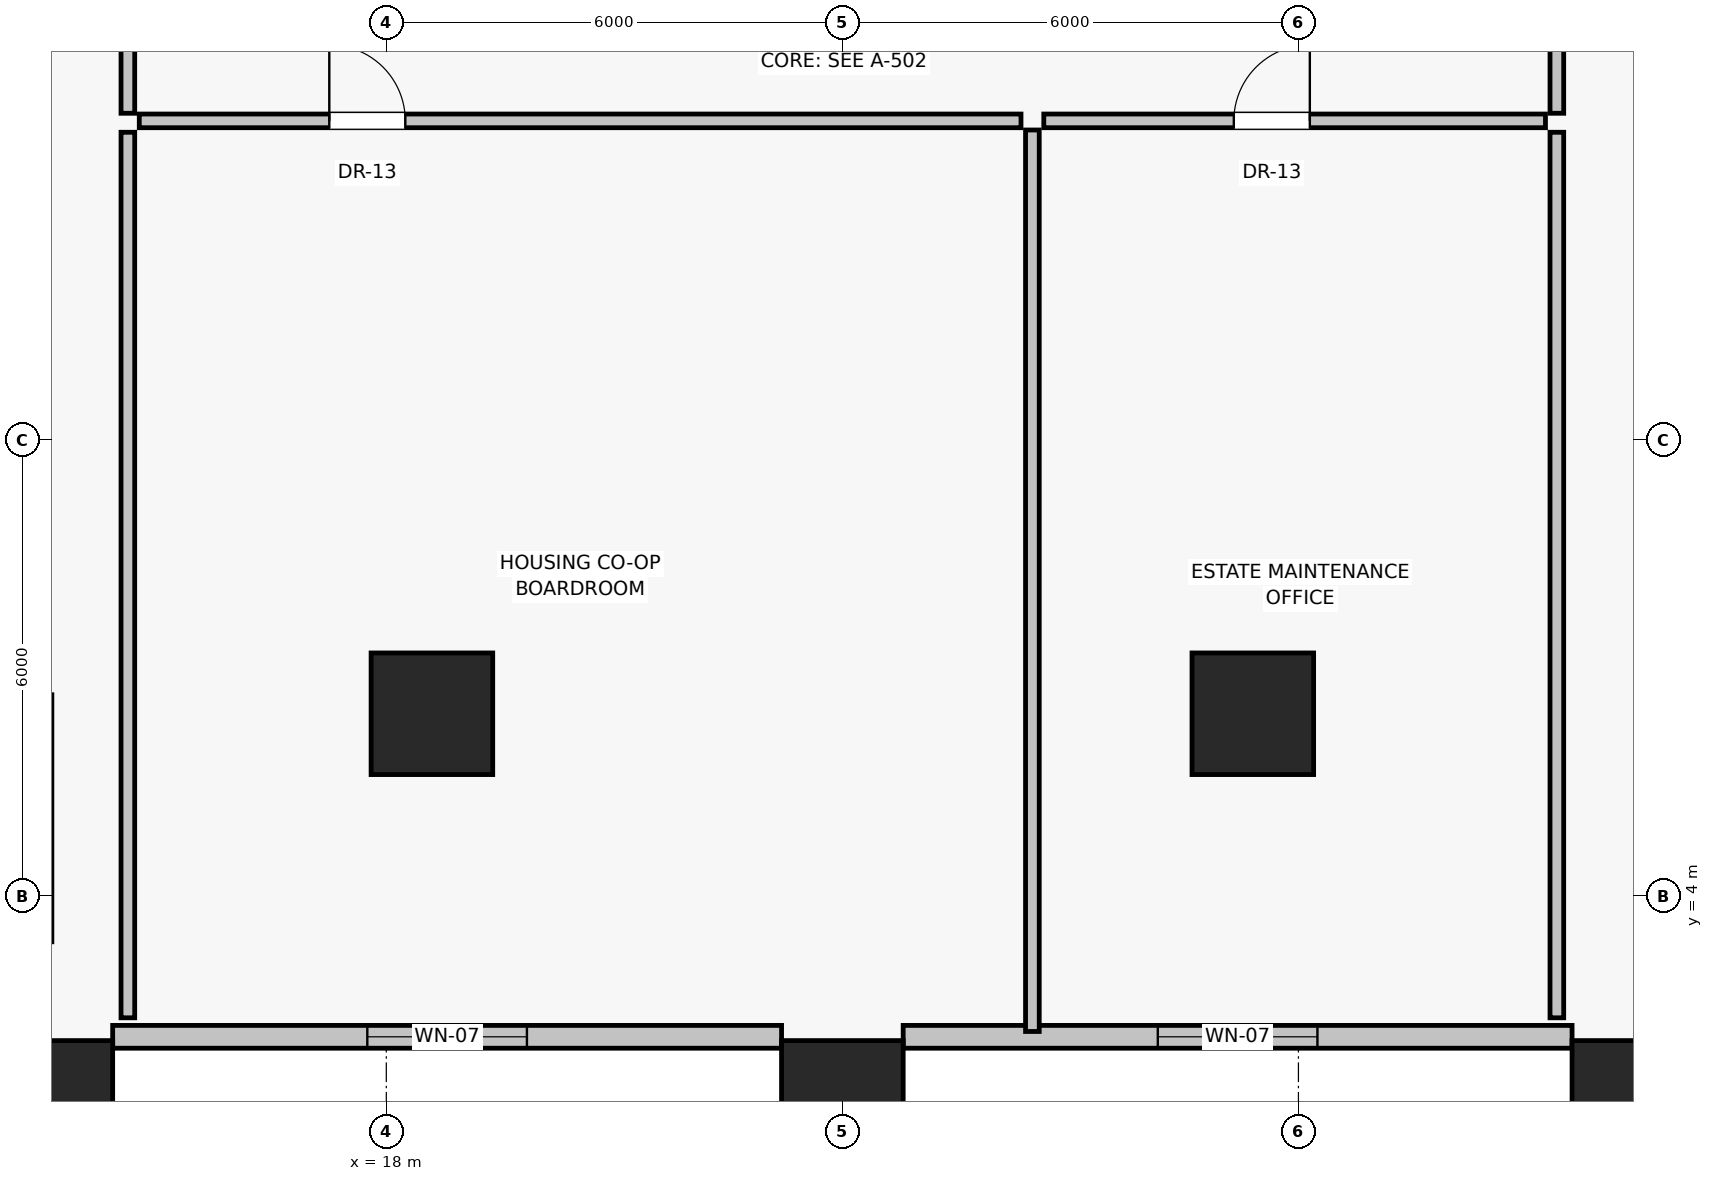
"""IFC4 building model, lengths in metres.
Left out: names, types, materials, properties, quantities, classifications, styles, units other than length and angle.
Written with IfcOpenShell. Run it as: python <this file> out.ifc"""

import sys

from ifc_helpers import new_model, si_unit, direction, frame, frame_2d, origin, origin_2d, place, context, subcontext, project, spatial, rectangle, extrude, source, transform, mapped, element, fill, save


model = new_model("IFC4")
c1 = context("Model", 3, precision=1e-05, world=origin(), true_north=direction((0.0, 1.0)))
c2 = subcontext(c1, "Body", "Model", "MODEL_VIEW")
j1 = project(units=[si_unit("LENGTHUNIT", "METRE"), si_unit("PLANEANGLEUNIT", "RADIAN")], contexts=[c1])
p1 = place(None, origin())
s1 = spatial("IfcSite", under=j1, at=p1, CompositionType="ELEMENT")
p2 = place(p1, origin())
s2 = spatial("IfcBuilding", under=s1, at=p2, CompositionType="ELEMENT")
p3 = place(p2, frame((0.0, 0.0, 18.4)))
s3 = spatial("IfcBuildingStorey", under=s2, at=p3, CompositionType="ELEMENT", Elevation=18.4)
for number, where, z_axis, x_axis in (
    (1, (13.6, 1.3, 0.0), (0.0, 0.0, 1.0), (1.0, 0.0, 0.0)),
    (2, (24.0, 1.3, 0.0), (0.0, 0.0, 1.0), (1.0, 0.0, 0.0)),
    (3, (34.4, 1.3, 0.0), (0.0, 0.0, 1.0), (1.0, 0.0, 0.0)),
    (4, (18.6, 6.4, 0.0), (0.0, 0.0, 1.0), (1.0, 0.0, 0.0)),
    (5, (29.4, 6.4, 0.0), (0.0, 0.0, 1.0), (1.0, 0.0, 0.0)),
):
    element("IfcColumn", number, at=place(p3, frame(where, z_axis=z_axis, x_axis=x_axis)), inside=s3, PredefinedType="COLUMN", context=c2, shape_type="SweptSolid", body=[
        extrude(rectangle(XDim=1.6, YDim=1.6, at=origin_2d()), origin(), (0.0, 0.0, 1.0), 4.4),
    ])
p4 = place(p3, frame((14.4, 2.15, 0.0), z_axis=(0.0, 0.0, 1.0), x_axis=(1.0, 0.0, 0.0)))
e6 = element("IfcWall", 6, at=p4, inside=s3, PredefinedType="SOLIDWALL", context=c2, shape_type="SweptSolid", body=[
    extrude(rectangle(XDim=8.8, YDim=0.3, at=frame_2d((4.4, 0.0))), origin(), (0.0, 0.0, 1.0), 2.95),
])
p5 = place(p4, frame((3.35, 0.0, 0.85)))
e7 = element("IfcOpeningElement", 7, at=p5, cuts=e6, PredefinedType="OPENING", context=c2, shape_type="SweptSolid", body=[
    extrude(rectangle(XDim=2.1, YDim=1.75, at=frame_2d((1.05, 0.875))), frame((0.0, 0.16, 0.0), z_axis=(0.0, -1.0, 0.0), x_axis=(1.0, 0.0, 0.0)), (0.0, 0.0, 1.0), 0.32),
])
p6 = place(p3, frame((24.8, 2.15, 0.0), z_axis=(0.0, 0.0, 1.0), x_axis=(1.0, 0.0, 0.0)))
e8 = element("IfcWall", 8, at=p6, inside=s3, PredefinedType="SOLIDWALL", context=c2, shape_type="SweptSolid", body=[
    extrude(rectangle(XDim=8.8, YDim=0.3, at=frame_2d((4.4, 0.0))), origin(), (0.0, 0.0, 1.0), 2.95),
])
p7 = place(p6, frame((3.35, 0.0, 0.85)))
e9 = element("IfcOpeningElement", 9, at=p7, cuts=e8, PredefinedType="OPENING", context=c2, shape_type="SweptSolid", body=[
    extrude(rectangle(XDim=2.1, YDim=1.75, at=frame_2d((1.05, 0.875))), frame((0.0, 0.16, 0.0), z_axis=(0.0, -1.0, 0.0), x_axis=(1.0, 0.0, 0.0)), (0.0, 0.0, 1.0), 0.32),
])
p8 = place(p3, frame((14.6, 14.3, 0.0), z_axis=(0.0, 0.0, 1.0), x_axis=(0.0, 1.0, 0.0)))
e10 = element("IfcWall", 10, at=p8, inside=s3, PredefinedType="PARTITIONING", context=c2, shape_type="SweptSolid", body=[
    extrude(rectangle(XDim=8.55, YDim=0.18, at=frame_2d((4.275, 0.0))), origin(), (0.0, 0.0, 1.0), 4.05),
])
p9 = place(p8, frame((2.5, 0.0, 0.0)))
e11 = element("IfcOpeningElement", 11, at=p9, cuts=e10, PredefinedType="OPENING", context=c2, shape_type="SweptSolid", body=[
    extrude(rectangle(XDim=1.0, YDim=2.01, at=frame_2d((0.5, 1.005))), frame((0.0, 0.1, 0.0), z_axis=(0.0, -1.0, 0.0), x_axis=(1.0, 0.0, 0.0)), (0.0, 0.0, 1.0), 0.2),
])
p10 = place(p3, frame((14.6, 2.4, 0.0), z_axis=(0.0, 0.0, 1.0), x_axis=(0.0, 1.0, 0.0)))
e12 = element("IfcWall", 12, at=p10, inside=s3, PredefinedType="PARTITIONING", context=c2, shape_type="SweptSolid", body=[
    extrude(rectangle(XDim=11.65, YDim=0.18, at=frame_2d((5.825, 0.0))), origin(), (0.0, 0.0, 1.0), 4.05),
])
p11 = place(p3, frame((14.75, 14.2, 0.0), z_axis=(0.0, 0.0, 1.0), x_axis=(1.0, 0.0, 0.0)))
e13 = element("IfcWall", 13, at=p11, inside=s3, PredefinedType="PARTITIONING", context=c2, shape_type="SweptSolid", body=[
    extrude(rectangle(XDim=11.6, YDim=0.18, at=frame_2d((5.8, 0.0))), origin(), (0.0, 0.0, 1.0), 4.05),
])
p12 = place(p11, frame((2.5, 0.0, 0.0)))
e14 = element("IfcOpeningElement", 14, at=p12, cuts=e13, PredefinedType="OPENING", context=c2, shape_type="SweptSolid", body=[
    extrude(rectangle(XDim=1.0, YDim=2.01, at=frame_2d((0.5, 1.005))), frame((0.0, 0.1, 0.0), z_axis=(0.0, -1.0, 0.0), x_axis=(1.0, 0.0, 0.0)), (0.0, 0.0, 1.0), 0.2),
])
p13 = place(p3, frame((26.65, 14.2, 0.0), z_axis=(0.0, 0.0, 1.0), x_axis=(1.0, 0.0, 0.0)))
e15 = element("IfcWall", 15, at=p13, inside=s3, PredefinedType="PARTITIONING", context=c2, shape_type="SweptSolid", body=[
    extrude(rectangle(XDim=6.6, YDim=0.18, at=frame_2d((3.3, 0.0))), origin(), (0.0, 0.0, 1.0), 4.05),
])
p14 = place(p13, frame((2.5, 0.0, 0.0)))
e16 = element("IfcOpeningElement", 16, at=p14, cuts=e15, PredefinedType="OPENING", context=c2, shape_type="SweptSolid", body=[
    extrude(rectangle(XDim=1.0, YDim=2.01, at=frame_2d((0.5, 1.005))), frame((0.0, 0.1, 0.0), z_axis=(0.0, -1.0, 0.0), x_axis=(1.0, 0.0, 0.0)), (0.0, 0.0, 1.0), 0.2),
])
p15 = place(p3, frame((26.5, 2.22, 0.0), z_axis=(0.0, 0.0, 1.0), x_axis=(0.0, 1.0, 0.0)))
e17 = element("IfcWall", 17, at=p15, inside=s3, PredefinedType="PARTITIONING", context=c2, shape_type="SweptSolid", body=[
    extrude(rectangle(XDim=11.86, YDim=0.18, at=frame_2d((5.93, 0.0))), origin(), (0.0, 0.0, 1.0), 4.05),
])
p16 = place(p3, frame((33.4, 2.4, 0.0), z_axis=(0.0, 0.0, 1.0), x_axis=(0.0, 1.0, 0.0)))
e18 = element("IfcWall", 18, at=p16, inside=s3, PredefinedType="PARTITIONING", context=c2, shape_type="SweptSolid", body=[
    extrude(rectangle(XDim=11.65, YDim=0.18, at=frame_2d((5.825, 0.0))), origin(), (0.0, 0.0, 1.0), 4.05),
])
p17 = place(p3, frame((33.4, 14.3, 0.0), z_axis=(0.0, 0.0, 1.0), x_axis=(0.0, 1.0, 0.0)))
e19 = element("IfcWall", 19, at=p17, inside=s3, PredefinedType="PARTITIONING", context=c2, shape_type="SweptSolid", body=[
    extrude(rectangle(XDim=11.05, YDim=0.18, at=frame_2d((5.525, 0.0))), origin(), (0.0, 0.0, 1.0), 4.05),
])
p18 = place(p17, frame((2.2, 0.0, 0.0)))
e20 = element("IfcOpeningElement", 20, at=p18, cuts=e19, PredefinedType="OPENING", context=c2, shape_type="SweptSolid", body=[
    extrude(rectangle(XDim=1.0, YDim=2.01, at=frame_2d((0.5, 1.005))), frame((0.0, 0.1, 0.0), z_axis=(0.0, -1.0, 0.0), x_axis=(1.0, 0.0, 0.0)), (0.0, 0.0, 1.0), 0.2),
])
m1 = source(origin(), c2, "Body", "SweptSolid", [
    extrude(rectangle(XDim=2.1, YDim=1.75, at=frame_2d((1.05, 0.875))), frame((0.0, 0.03, 0.0), z_axis=(0.0, -1.0, 0.0), x_axis=(1.0, 0.0, 0.0)), (0.0, 0.0, 1.0), 0.06),
])
p19 = place(p5, origin())
e21 = element("IfcWindow", 21, at=p19, inside=s3, PartitioningType="DOUBLE_PANEL_VERTICAL", PredefinedType="WINDOW", context=c2, shape_type="MappedRepresentation", body=[
    mapped(m1, transform((0.0, 0.0, 0.0), scale=1.0)),
])
fill(e7, e21)
p20 = place(p7, origin())
e22 = element("IfcWindow", 22, at=p20, inside=s3, PartitioningType="DOUBLE_PANEL_VERTICAL", PredefinedType="WINDOW", context=c2, shape_type="MappedRepresentation", body=[
    mapped(m1, transform((0.0, 0.0, 0.0), scale=1.0)),
])
fill(e9, e22)
m2 = source(origin(), c2, "Body", "SweptSolid", [
    extrude(rectangle(XDim=1.0, YDim=2.01, at=frame_2d((0.5, 1.005))), frame((0.0, 0.025, 0.0), z_axis=(0.0, -1.0, 0.0), x_axis=(1.0, 0.0, 0.0)), (0.0, 0.0, 1.0), 0.05),
])
p21 = place(p12, origin())
e23 = element("IfcDoor", 23, at=p21, inside=s3, OperationType="SINGLE_SWING_LEFT", PredefinedType="DOOR", context=c2, shape_type="MappedRepresentation", body=[
    mapped(m2, transform((0.0, 0.0, 0.0), scale=1.0)),
])
fill(e14, e23)
p22 = place(p14, origin())
e24 = element("IfcDoor", 24, at=p22, inside=s3, OperationType="SINGLE_SWING_RIGHT", PredefinedType="DOOR", context=c2, shape_type="MappedRepresentation", body=[
    mapped(m2, transform((0.0, 0.0, 0.0), scale=1.0)),
])
fill(e16, e24)
save(model, sys.argv[1])
